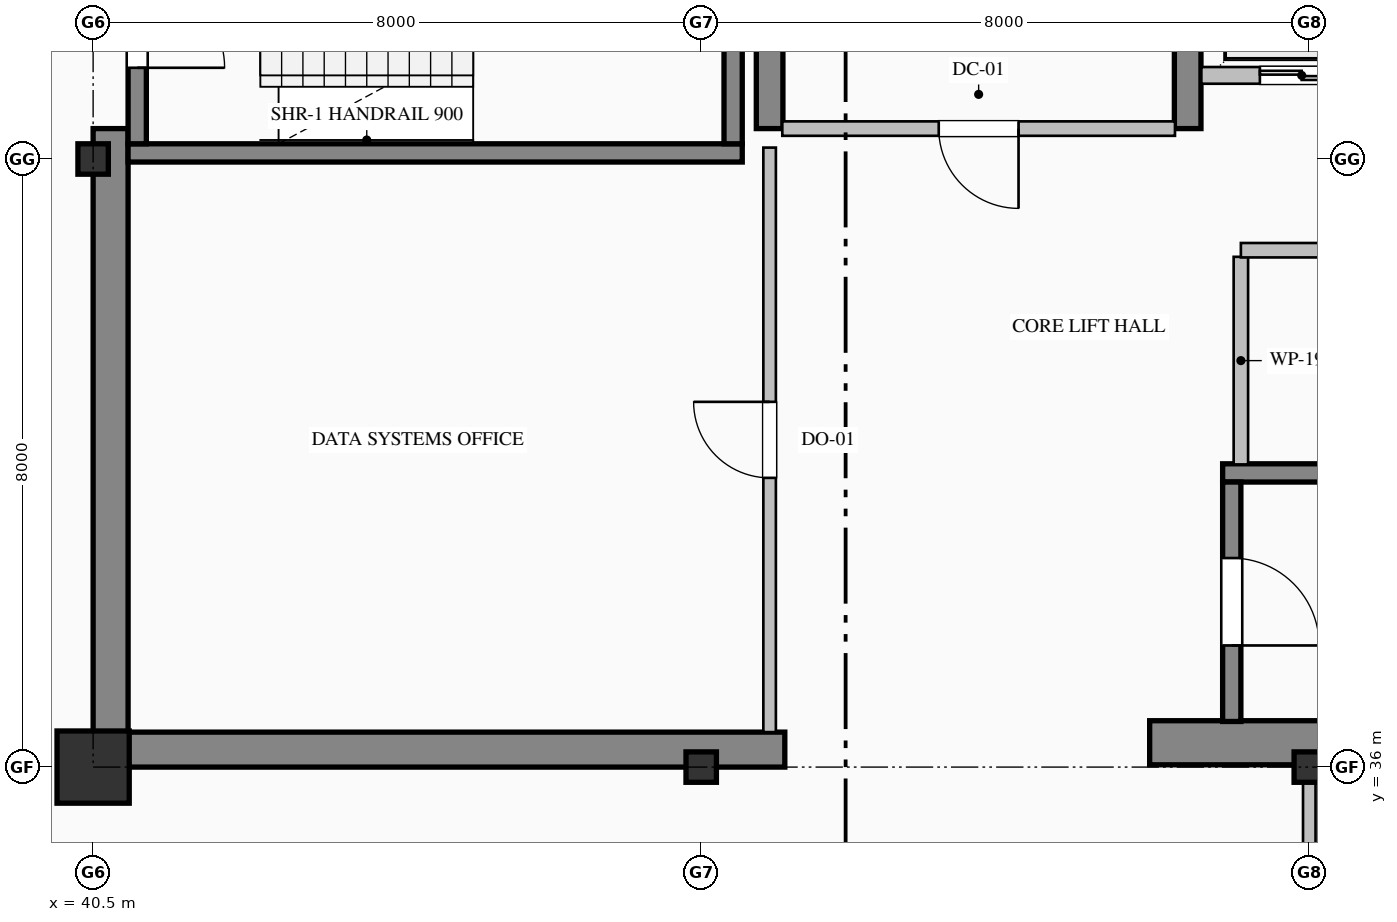
"""IFC4 building model, lengths in metres.
Left out: names, types, materials, properties, quantities, classifications, styles, units other than length and angle.
Written with IfcOpenShell. Run it as: python <this file> out.ifc"""

import sys

from ifc_helpers import new_model, si_unit, direction, frame, frame_2d, origin, origin_2d, place, context, subcontext, project, spatial, rectangle, hollow_rectangle, i_section, extrude, element, fill, save


model = new_model("IFC4")
c1 = context("Model", 3, precision=1e-05, world=origin(), true_north=direction((0.0, 1.0)))
c2 = subcontext(c1, "Body", "Model", "MODEL_VIEW")
j1 = project(units=[si_unit("LENGTHUNIT", "METRE"), si_unit("PLANEANGLEUNIT", "RADIAN")], contexts=[c1])
p1 = place(None, origin())
s1 = spatial("IfcSite", under=j1, at=p1, CompositionType="ELEMENT")
p2 = place(p1, origin())
s2 = spatial("IfcBuilding", under=s1, at=p2, CompositionType="ELEMENT")
p3 = place(p2, frame((0.0, 0.0, 253.8)))
s3 = spatial("IfcBuildingStorey", under=s2, at=p3, CompositionType="ELEMENT", Elevation=253.8)
p4 = place(p3, frame((40.73, 36.46, 0.0), z_axis=(0.0, 0.0, 1.0), x_axis=(0.0, 1.0, 0.0)))
e1 = element("IfcWall", 1, at=p4, inside=s3, PredefinedType="SHEAR", context=c2, shape_type="SweptSolid", body=[
    extrude(rectangle(XDim=7.94, YDim=0.46, at=frame_2d((3.97, 0.0))), origin(), (0.0, 0.0, 1.0), 3.775),
])
p5 = place(p3, frame((40.5, 36.23, 0.0), z_axis=(0.0, 0.0, 1.0), x_axis=(1.0, 0.0, 0.0)))
e2 = element("IfcWall", 2, at=p5, inside=s3, PredefinedType="SHEAR", context=c2, shape_type="SweptSolid", body=[
    extrude(rectangle(XDim=9.1, YDim=0.46, at=frame_2d((4.55, 0.0))), origin(), (0.0, 0.0, 1.0), 3.775),
])
p6 = place(p3, frame((54.4, 36.32, 0.0), z_axis=(0.0, 0.0, 1.0), x_axis=(1.0, 0.0, 0.0)))
e3 = element("IfcWall", 3, at=p6, inside=s3, PredefinedType="SHEAR", context=c2, shape_type="SweptSolid", body=[
    extrude(rectangle(XDim=9.6, YDim=0.58, at=frame_2d((4.8, 0.0))), origin(), (0.0, 0.0, 1.0), 4.0),
])
p7 = place(p3, frame((49.4, 44.4, 0.0), z_axis=(0.0, 0.0, 1.0), x_axis=(0.0, 1.0, 0.0)))
e4 = element("IfcWall", 4, at=p7, inside=s3, PredefinedType="SHEAR", context=c2, shape_type="SweptSolid", body=[
    extrude(rectangle(XDim=3.0, YDim=0.35, at=frame_2d((1.5, 0.0))), origin(), (0.0, 0.0, 1.0), 3.775),
])
p8 = place(p3, frame((54.9, 44.4, 0.0), z_axis=(0.0, 0.0, 1.0), x_axis=(0.0, 1.0, 0.0)))
e5 = element("IfcWall", 5, at=p8, inside=s3, PredefinedType="SHEAR", context=c2, shape_type="SweptSolid", body=[
    extrude(rectangle(XDim=7.14, YDim=0.35, at=frame_2d((3.57, 0.0))), origin(), (0.0, 0.0, 1.0), 3.775),
])
p9 = place(p3, frame((40.5, 36.0, 0.0), z_axis=(0.0, 0.0, 1.0), x_axis=(1.0, 0.0, 0.0)))
e6 = element("IfcColumn", 6, at=p9, inside=s3, PredefinedType="COLUMN", context=c2, shape_type="SweptSolid", body=[
    extrude(hollow_rectangle(XDim=0.95, YDim=0.95, WallThickness=0.036, at=origin_2d()), origin(), (0.0, 0.0, 1.0), 4.0),
])
for number, where, z_axis, x_axis in (
    (7, (40.5, 44.0, 0.0), (0.0, 0.0, 1.0), (1.0, 0.0, 0.0)),
    (8, (48.5, 36.0, 0.0), (0.0, 0.0, 1.0), (1.0, 0.0, 0.0)),
    (9, (56.5, 36.0, 0.0), (0.0, 0.0, 1.0), (1.0, 0.0, 0.0)),
):
    element("IfcColumn", number, at=place(p3, frame(where, z_axis=z_axis, x_axis=x_axis)), inside=s3, PredefinedType="COLUMN", context=c2, shape_type="SweptSolid", body=[
        extrude(i_section(OverallWidth=0.4, OverallDepth=0.4, WebThickness=0.013, FlangeThickness=0.021, FilletRadius=0.022, at=origin_2d()), origin(), (0.0, 0.0, 1.0), 4.0),
    ])
p10 = place(p3, frame((49.04, 44.08, 0.0), z_axis=(0.0, 0.0, 1.0), x_axis=(-1.0, 0.0, 0.0)))
e10 = element("IfcWall", 10, at=p10, inside=s3, PredefinedType="SOLIDWALL", context=c2, shape_type="SweptSolid", body=[
    extrude(rectangle(XDim=8.08, YDim=0.24, at=frame_2d((4.04, 0.0))), origin(), (0.0, 0.0, 1.0), 4.0),
])
p11 = place(p3, frame((41.08, 47.35, 0.0), z_axis=(0.0, 0.0, 1.0), x_axis=(0.0, -1.0, 0.0)))
e11 = element("IfcWall", 11, at=p11, inside=s3, PredefinedType="SOLIDWALL", context=c2, shape_type="SweptSolid", body=[
    extrude(rectangle(XDim=3.15, YDim=0.24, at=frame_2d((1.575, 0.0))), origin(), (0.0, 0.0, 1.0), 4.0),
])
p12 = place(p11, frame((1.0, 0.0, 0.0)))
e12 = element("IfcOpeningElement", 12, at=p12, cuts=e11, PredefinedType="OPENING", context=c2, shape_type="SweptSolid", body=[
    extrude(rectangle(XDim=1.15, YDim=2.2, at=frame_2d((0.575, 1.1))), frame((0.0, 0.13, 0.0), z_axis=(0.0, -1.0, 0.0), x_axis=(1.0, 0.0, 0.0)), (0.0, 0.0, 1.0), 0.26),
])
p13 = place(p3, frame((48.92, 44.2, 0.0), z_axis=(0.0, 0.0, 1.0), x_axis=(0.0, 1.0, 0.0)))
e13 = element("IfcWall", 13, at=p13, inside=s3, PredefinedType="SOLIDWALL", context=c2, shape_type="SweptSolid", body=[
    extrude(rectangle(XDim=3.15, YDim=0.24, at=frame_2d((1.575, 0.0))), origin(), (0.0, 0.0, 1.0), 4.0),
])
p14 = place(p3, frame((55.36, 39.87, 0.0), z_axis=(0.0, 0.0, 1.0), x_axis=(1.0, 0.0, 0.0)))
e14 = element("IfcWall", 14, at=p14, inside=s3, PredefinedType="SOLIDWALL", context=c2, shape_type="SweptSolid", body=[
    extrude(rectangle(XDim=8.08, YDim=0.24, at=frame_2d((4.04, 0.0))), origin(), (0.0, 0.0, 1.0), 4.0),
])
p15 = place(p3, frame((55.48, 39.75, 0.0), z_axis=(0.0, 0.0, 1.0), x_axis=(0.0, -1.0, 0.0)))
e15 = element("IfcWall", 15, at=p15, inside=s3, PredefinedType="SOLIDWALL", context=c2, shape_type="SweptSolid", body=[
    extrude(rectangle(XDim=3.15, YDim=0.24, at=frame_2d((1.575, 0.0))), origin(), (0.0, 0.0, 1.0), 4.0),
])
p16 = place(p15, frame((1.0, 0.0, 0.0)))
e16 = element("IfcOpeningElement", 16, at=p16, cuts=e15, PredefinedType="OPENING", context=c2, shape_type="SweptSolid", body=[
    extrude(rectangle(XDim=1.15, YDim=2.2, at=frame_2d((0.575, 1.1))), frame((0.0, 0.13, 0.0), z_axis=(0.0, -1.0, 0.0), x_axis=(1.0, 0.0, 0.0)), (0.0, 0.0, 1.0), 0.26),
])
p17 = place(p3, frame((63.32, 45.1, 0.0), z_axis=(0.0, 0.0, 1.0), x_axis=(-1.0, 0.0, 0.0)))
e17 = element("IfcWall", 17, at=p17, inside=s3, PredefinedType="PARTITIONING", context=c2, shape_type="SweptSolid", body=[
    extrude(rectangle(XDim=8.24, YDim=0.22, at=frame_2d((4.12, 0.0))), origin(), (0.0, 0.0, 1.0), 3.775),
])
p18 = place(p17, frame((6.37, 0.0, 0.0)))
e18 = element("IfcOpeningElement", 18, at=p18, cuts=e17, PredefinedType="OPENING", context=c2, shape_type="SweptSolid", body=[
    extrude(rectangle(XDim=1.1, YDim=2.2, at=frame_2d((0.55, 1.1))), frame((0.0, 0.12, 0.0), z_axis=(0.0, -1.0, 0.0), x_axis=(1.0, 0.0, 0.0)), (0.0, 0.0, 1.0), 0.24),
])
p19 = place(p17, frame((3.57, 0.0, 0.0)))
e19 = element("IfcOpeningElement", 19, at=p19, cuts=e17, PredefinedType="OPENING", context=c2, shape_type="SweptSolid", body=[
    extrude(rectangle(XDim=1.1, YDim=2.2, at=frame_2d((0.55, 1.1))), frame((0.0, 0.12, 0.0), z_axis=(0.0, -1.0, 0.0), x_axis=(1.0, 0.0, 0.0)), (0.0, 0.0, 1.0), 0.24),
])
p20 = place(p17, frame((0.77, 0.0, 0.0)))
e20 = element("IfcOpeningElement", 20, at=p20, cuts=e17, PredefinedType="OPENING", context=c2, shape_type="SweptSolid", body=[
    extrude(rectangle(XDim=1.1, YDim=2.2, at=frame_2d((0.55, 1.1))), frame((0.0, 0.12, 0.0), z_axis=(0.0, -1.0, 0.0), x_axis=(1.0, 0.0, 0.0)), (0.0, 0.0, 1.0), 0.24),
])
p21 = place(p3, frame((54.733, 44.4, 0.0), z_axis=(0.0, 0.0, 1.0), x_axis=(-1.0, 0.0, 0.0)))
e21 = element("IfcWall", 21, at=p21, inside=s3, PredefinedType="PARTITIONING", context=c2, shape_type="SweptSolid", body=[
    extrude(rectangle(XDim=5.166, YDim=0.19, at=frame_2d((2.583, 0.0))), origin(), (0.0, 0.0, 1.0), 3.775),
])
p22 = place(p21, frame((2.058, 0.0, 0.0)))
e22 = element("IfcOpeningElement", 22, at=p22, cuts=e21, PredefinedType="OPENING", context=c2, shape_type="SweptSolid", body=[
    extrude(rectangle(XDim=1.05, YDim=2.15, at=frame_2d((0.525, 1.075))), frame((0.0, 0.105, 0.0), z_axis=(0.0, -1.0, 0.0), x_axis=(1.0, 0.0, 0.0)), (0.0, 0.0, 1.0), 0.21),
])
p23 = place(p3, frame((49.4, 36.46, 0.0), z_axis=(0.0, 0.0, 1.0), x_axis=(0.0, 1.0, 0.0)))
e23 = element("IfcWall", 23, at=p23, inside=s3, PredefinedType="PARTITIONING", context=c2, shape_type="SweptSolid", body=[
    extrude(rectangle(XDim=7.69, YDim=0.165, at=frame_2d((3.845, 0.0))), origin(), (0.0, 0.0, 1.0), 3.017),
])
p24 = place(p23, frame((3.345, 0.0, 0.0)))
e24 = element("IfcOpeningElement", 24, at=p24, cuts=e23, PredefinedType="OPENING", context=c2, shape_type="SweptSolid", body=[
    extrude(rectangle(XDim=1.0, YDim=2.15, at=frame_2d((0.5, 1.075))), frame((0.0, 0.093, 0.0), z_axis=(0.0, -1.0, 0.0), x_axis=(1.0, 0.0, 0.0)), (0.0, 0.0, 1.0), 0.185),
])
p25 = place(p3, frame((55.6, 42.713, 0.0), z_axis=(0.0, 0.0, 1.0), x_axis=(0.0, -1.0, 0.0)))
e25 = element("IfcWall", 25, at=p25, inside=s3, PredefinedType="PARTITIONING", context=c2, shape_type="SweptSolid", body=[
    extrude(rectangle(XDim=2.731, YDim=0.19, at=frame_2d((1.365, 0.0))), origin(), (0.0, 0.0, 1.0), 3.775),
])
p26 = place(p3, frame((63.54, 42.8, 0.0), z_axis=(0.0, 0.0, 1.0), x_axis=(-1.0, 0.0, 0.0)))
e26 = element("IfcWall", 26, at=p26, inside=s3, PredefinedType="PARTITIONING", context=c2, shape_type="SweptSolid", body=[
    extrude(rectangle(XDim=7.94, YDim=0.19, at=frame_2d((3.97, 0.0))), origin(), (0.0, 0.0, 1.0), 3.775),
])
p27 = place(p26, frame((3.27, 0.0, 0.0)))
e27 = element("IfcOpeningElement", 27, at=p27, cuts=e26, PredefinedType="OPENING", context=c2, shape_type="SweptSolid", body=[
    extrude(rectangle(XDim=1.4, YDim=2.25, at=frame_2d((0.7, 1.125))), frame((0.0, 0.105, 0.0), z_axis=(0.0, -1.0, 0.0), x_axis=(1.0, 0.0, 0.0)), (0.0, 0.0, 1.0), 0.21),
])
p28 = place(p3, frame((56.5, 36.0, 0.0), z_axis=(0.0, 0.0, 1.0), x_axis=(0.0, -1.0, 0.0)))
e28 = element("IfcWall", 28, at=p28, inside=s3, PredefinedType="PARTITIONING", context=c2, shape_type="SweptSolid", body=[
    extrude(rectangle(XDim=5.525, YDim=0.165, at=frame_2d((2.763, 0.0))), origin(), (0.0, 0.0, 1.0), 3.179),
])
p29 = place(p28, frame((2.263, 0.0, 0.0)))
e29 = element("IfcOpeningElement", 29, at=p29, cuts=e28, PredefinedType="OPENING", context=c2, shape_type="SweptSolid", body=[
    extrude(rectangle(XDim=1.0, YDim=2.15, at=frame_2d((0.5, 1.075))), frame((0.0, 0.093, 0.0), z_axis=(0.0, -1.0, 0.0), x_axis=(1.0, 0.0, 0.0)), (0.0, 0.0, 1.0), 0.185),
])
p30 = place(p12, origin())
e30 = element("IfcDoor", 30, at=p30, inside=s3, OperationType="SINGLE_SWING_RIGHT", PredefinedType="DOOR", context=c2, shape_type="SweptSolid", body=[
    extrude(rectangle(XDim=1.15, YDim=2.2, at=frame_2d((0.575, 1.1))), frame((0.0, 0.025, 0.0), z_axis=(0.0, -1.0, 0.0), x_axis=(1.0, 0.0, 0.0)), (0.0, 0.0, 1.0), 0.05),
])
fill(e12, e30)
p31 = place(p16, origin())
e31 = element("IfcDoor", 31, at=p31, inside=s3, OperationType="SINGLE_SWING_RIGHT", PredefinedType="DOOR", context=c2, shape_type="SweptSolid", body=[
    extrude(rectangle(XDim=1.15, YDim=2.2, at=frame_2d((0.575, 1.1))), frame((0.0, 0.025, 0.0), z_axis=(0.0, -1.0, 0.0), x_axis=(1.0, 0.0, 0.0)), (0.0, 0.0, 1.0), 0.05),
])
fill(e16, e31)
p32 = place(p18, origin())
e32 = element("IfcDoor", 32, at=p32, inside=s3, OperationType="DOUBLE_DOOR_SLIDING", PredefinedType="DOOR", context=c2, shape_type="SweptSolid", body=[
    extrude(rectangle(XDim=1.1, YDim=2.2, at=frame_2d((0.55, 1.1))), frame((0.0, 0.025, 0.0), z_axis=(0.0, -1.0, 0.0), x_axis=(1.0, 0.0, 0.0)), (0.0, 0.0, 1.0), 0.05),
])
fill(e18, e32)
p33 = place(p22, origin())
e33 = element("IfcDoor", 33, at=p33, inside=s3, OperationType="SINGLE_SWING_LEFT", PredefinedType="DOOR", context=c2, shape_type="SweptSolid", body=[
    extrude(rectangle(XDim=1.05, YDim=2.15, at=frame_2d((0.525, 1.075))), frame((0.0, 0.025, 0.0), z_axis=(0.0, -1.0, 0.0), x_axis=(1.0, 0.0, 0.0)), (0.0, 0.0, 1.0), 0.05),
])
fill(e22, e33)
p34 = place(p24, origin())
e34 = element("IfcDoor", 34, at=p34, inside=s3, OperationType="SINGLE_SWING_RIGHT", PredefinedType="DOOR", context=c2, shape_type="SweptSolid", body=[
    extrude(rectangle(XDim=1.0, YDim=2.15, at=frame_2d((0.5, 1.075))), frame((0.0, 0.025, 0.0), z_axis=(0.0, -1.0, 0.0), x_axis=(1.0, 0.0, 0.0)), (0.0, 0.0, 1.0), 0.05),
])
fill(e24, e34)
save(model, sys.argv[1])
